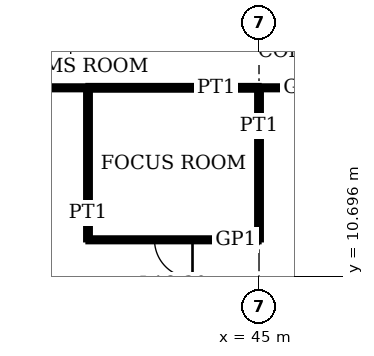
"""IFC4 building model, lengths in metres.
Left out: names, types, materials, properties, quantities, classifications, styles, units other than length and angle.
Written with IfcOpenShell. Run it as: python <this file> out.ifc"""

import sys

from ifc_helpers import new_model, si_unit, direction, frame, frame_2d, origin, place, context, subcontext, project, spatial, rectangle, extrude, element, fill, save


model = new_model("IFC4")
c1 = context("Model", 3, precision=1e-05, world=origin(), true_north=direction((0.0, 1.0)))
c2 = subcontext(c1, "Body", "Model", "MODEL_VIEW")
j1 = project(units=[si_unit("LENGTHUNIT", "METRE"), si_unit("PLANEANGLEUNIT", "RADIAN")], contexts=[c1])
p1 = place(None, origin())
s1 = spatial("IfcSite", under=j1, at=p1, CompositionType="ELEMENT")
p2 = place(p1, origin())
s2 = spatial("IfcBuilding", under=s1, at=p2, CompositionType="ELEMENT")
p3 = place(p2, frame((0.0, 0.0, 75.8)))
s3 = spatial("IfcBuildingStorey", under=s2, at=p3, CompositionType="ELEMENT", Elevation=75.8)
p4 = place(p3, frame((40.5, 11.65, 0.0), z_axis=(0.0, 0.0, 1.0), x_axis=(1.0, 0.0, 0.0)))
e1 = element("IfcWall", 1, at=p4, inside=s3, PredefinedType="PARTITIONING", context=c2, shape_type="SweptSolid", body=[
    extrude(rectangle(XDim=4.5, YDim=0.1, at=frame_2d((2.25, 0.0))), origin(), (0.0, 0.0, 1.0), 3.85),
])
p5 = place(p4, frame((1.75, 0.0, 0.0)))
e2 = element("IfcOpeningElement", 2, at=p5, cuts=e1, PredefinedType="OPENING", context=c2, shape_type="SweptSolid", body=[
    extrude(rectangle(XDim=1.0, YDim=2.4, at=frame_2d((0.5, 1.2))), frame((0.0, 0.06, 0.0), z_axis=(0.0, -1.0, 0.0), x_axis=(1.0, 0.0, 0.0)), (0.0, 0.0, 1.0), 0.12),
])
p6 = place(p3, frame((40.5, 15.65, 0.0), z_axis=(0.0, 0.0, 1.0), x_axis=(1.0, 0.0, 0.0)))
e3 = element("IfcWall", 3, at=p6, inside=s3, PredefinedType="PARTITIONING", context=c2, shape_type="SweptSolid", body=[
    extrude(rectangle(XDim=4.5, YDim=0.12, at=frame_2d((2.25, 0.0))), origin(), (0.0, 0.0, 1.0), 3.85),
])
p7 = place(p3, frame((15.65, 15.65, 0.0), z_axis=(0.0, 0.0, 1.0), x_axis=(1.0, 0.0, 0.0)))
e4 = element("IfcWall", 4, at=p7, inside=s3, PredefinedType="PARTITIONING", context=c2, shape_type="SweptSolid", body=[
    extrude(rectangle(XDim=24.85, YDim=0.1, at=frame_2d((12.425, 0.0))), origin(), (0.0, 0.0, 1.0), 3.85),
])
p8 = place(p7, frame((11.925, 0.0, 0.0)))
e5 = element("IfcOpeningElement", 5, at=p8, cuts=e4, PredefinedType="OPENING", context=c2, shape_type="SweptSolid", body=[
    extrude(rectangle(XDim=1.0, YDim=2.4, at=frame_2d((0.5, 1.2))), frame((0.0, 0.06, 0.0), z_axis=(0.0, -1.0, 0.0), x_axis=(1.0, 0.0, 0.0)), (0.0, 0.0, 1.0), 0.12),
])
p9 = place(p3, frame((45.0, 15.65, 0.0), z_axis=(0.0, 0.0, 1.0), x_axis=(1.0, 0.0, 0.0)))
e6 = element("IfcWall", 6, at=p9, inside=s3, PredefinedType="PARTITIONING", context=c2, shape_type="SweptSolid", body=[
    extrude(rectangle(XDim=2.35, YDim=0.1, at=frame_2d((1.175, 0.0))), origin(), (0.0, 0.0, 1.0), 3.85),
])
p10 = place(p3, frame((40.5, 11.65, 0.0), z_axis=(0.0, 0.0, 1.0), x_axis=(0.0, 1.0, 0.0)))
e7 = element("IfcWall", 7, at=p10, inside=s3, PredefinedType="PARTITIONING", context=c2, shape_type="SweptSolid", body=[
    extrude(rectangle(XDim=4.0, YDim=0.12, at=frame_2d((2.0, 0.0))), origin(), (0.0, 0.0, 1.0), 3.85),
])
p11 = place(p3, frame((45.0, 11.65, 0.0), z_axis=(0.0, 0.0, 1.0), x_axis=(0.0, 1.0, 0.0)))
e8 = element("IfcWall", 8, at=p11, inside=s3, PredefinedType="PARTITIONING", context=c2, shape_type="SweptSolid", body=[
    extrude(rectangle(XDim=4.0, YDim=0.12, at=frame_2d((2.0, 0.0))), origin(), (0.0, 0.0, 1.0), 3.25),
])
p12 = place(p5, origin())
e9 = element("IfcDoor", 9, at=p12, inside=s3, OperationType="SINGLE_SWING_RIGHT", PredefinedType="DOOR", context=c2, shape_type="SweptSolid", body=[
    extrude(rectangle(XDim=1.0, YDim=2.4, at=frame_2d((0.5, 1.2))), frame((0.0, 0.02, 0.0), z_axis=(0.0, -1.0, 0.0), x_axis=(1.0, 0.0, 0.0)), (0.0, 0.0, 1.0), 0.04),
])
fill(e2, e9)
save(model, sys.argv[1])
